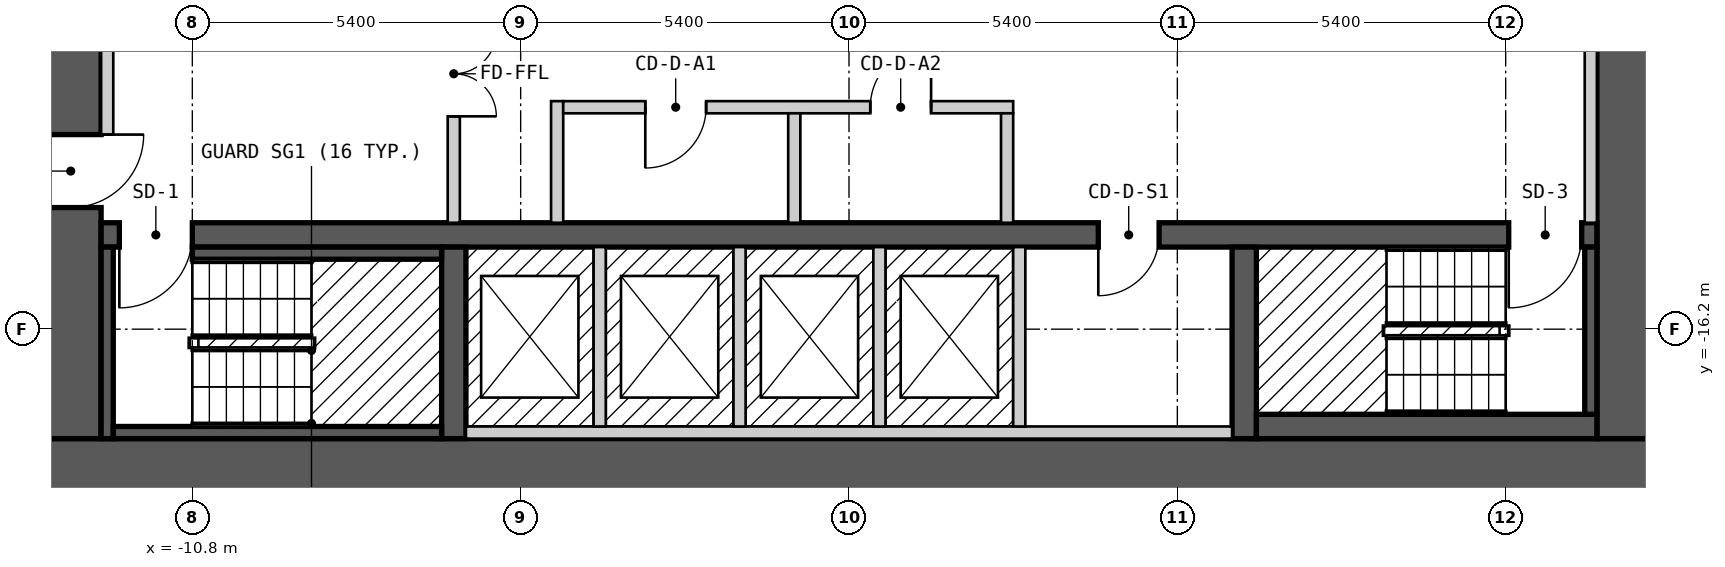
"""IFC4 building model, lengths in metres.
Left out: names, types, materials, properties, quantities, classifications, styles, units other than length and angle.
Written with IfcOpenShell. Run it as: python <this file> out.ifc"""

import sys

from ifc_helpers import new_model, si_unit, direction, frame, frame_2d, origin, place, context, subcontext, project, spatial, rectangle, extrude, element, fill, save


model = new_model("IFC4")
c1 = context("Model", 3, precision=1e-05, world=origin(), true_north=direction((0.0, 1.0)))
c2 = subcontext(c1, "Body", "Model", "MODEL_VIEW")
j1 = project(units=[si_unit("LENGTHUNIT", "METRE"), si_unit("PLANEANGLEUNIT", "RADIAN")], contexts=[c1])
p1 = place(None, origin())
s1 = spatial("IfcSite", under=j1, at=p1, CompositionType="ELEMENT")
p2 = place(p1, origin())
s2 = spatial("IfcBuilding", under=s1, at=p2, CompositionType="ELEMENT")
p3 = place(p2, frame((0.0, 0.0, 75.0)))
s3 = spatial("IfcBuildingStorey", under=s2, at=p3, CompositionType="ELEMENT", Elevation=75.0)
p4 = place(p3, frame((-13.3, -18.5, 0.0), z_axis=(0.0, 0.0, 1.0), x_axis=(1.0, 0.0, 0.0)))
e1 = element("IfcWall", 1, at=p4, inside=s3, PredefinedType="SHEAR", context=c2, shape_type="SweptSolid", body=[
    extrude(rectangle(XDim=26.6, YDim=1.0, at=frame_2d((13.3, 0.0))), origin(), (0.0, 0.0, 1.0), 2.7),
])
p5 = place(p3, frame((-12.8, -18.0, 0.0), z_axis=(0.0, 0.0, 1.0), x_axis=(0.0, 1.0, 0.0)))
e2 = element("IfcWall", 2, at=p5, inside=s3, PredefinedType="SHEAR", context=c2, shape_type="SweptSolid", body=[
    extrude(rectangle(XDim=12.0, YDim=1.0, at=frame_2d((6.0, 0.0))), origin(), (0.0, 0.0, 1.0), 2.7),
])
p6 = place(p5, frame((3.8, 0.0, 0.0)))
e3 = element("IfcOpeningElement", 3, at=p6, cuts=e2, PredefinedType="OPENING", context=c2, shape_type="SweptSolid", body=[
    extrude(rectangle(XDim=1.2, YDim=2.1, at=frame_2d((0.6, 1.05))), frame((0.0, 0.51, 0.0), z_axis=(0.0, -1.0, 0.0), x_axis=(1.0, 0.0, 0.0)), (0.0, 0.0, 1.0), 1.02),
])
p7 = place(p3, frame((12.8, -18.0, 0.0), z_axis=(0.0, 0.0, 1.0), x_axis=(0.0, 1.0, 0.0)))
e4 = element("IfcWall", 4, at=p7, inside=s3, PredefinedType="SHEAR", context=c2, shape_type="SweptSolid", body=[
    extrude(rectangle(XDim=12.0, YDim=1.0, at=frame_2d((6.0, 0.0))), origin(), (0.0, 0.0, 1.0), 2.7),
])
p8 = place(p3, frame((-12.3, -14.65, 0.0), z_axis=(0.0, 0.0, 1.0), x_axis=(1.0, 0.0, 0.0)))
e5 = element("IfcWall", 5, at=p8, inside=s3, PredefinedType="SHEAR", context=c2, shape_type="SweptSolid", body=[
    extrude(rectangle(XDim=24.6, YDim=0.4, at=frame_2d((12.3, 0.0))), origin(), (0.0, 0.0, 1.0), 2.7),
])
p9 = place(p8, frame((1.5, 0.0, 0.0), z_axis=(0.0, 0.0, 1.0), x_axis=(-1.0, 0.0, 0.0)))
e6 = element("IfcOpeningElement", 6, at=p9, cuts=e5, PredefinedType="OPENING", context=c2, shape_type="SweptSolid", body=[
    extrude(rectangle(XDim=1.2, YDim=2.1, at=frame_2d((0.6, 1.05))), frame((0.0, 0.21, 0.0), z_axis=(0.0, -1.0, 0.0), x_axis=(1.0, 0.0, 0.0)), (0.0, 0.0, 1.0), 0.42),
])
p10 = place(p8, frame((24.35, 0.0, 0.0), z_axis=(0.0, 0.0, 1.0), x_axis=(-1.0, 0.0, 0.0)))
e7 = element("IfcOpeningElement", 7, at=p10, cuts=e5, PredefinedType="OPENING", context=c2, shape_type="SweptSolid", body=[
    extrude(rectangle(XDim=1.2, YDim=2.1, at=frame_2d((0.6, 1.05))), frame((0.0, 0.21, 0.0), z_axis=(0.0, -1.0, 0.0), x_axis=(1.0, 0.0, 0.0)), (0.0, 0.0, 1.0), 0.42),
])
p11 = place(p8, frame((17.4, 0.0, 0.0), z_axis=(0.0, 0.0, 1.0), x_axis=(-1.0, 0.0, 0.0)))
e8 = element("IfcOpeningElement", 8, at=p11, cuts=e5, PredefinedType="OPENING", context=c2, shape_type="SweptSolid", body=[
    extrude(rectangle(XDim=1.0, YDim=2.1, at=frame_2d((0.5, 1.05))), frame((0.0, 0.21, 0.0), z_axis=(0.0, -1.0, 0.0), x_axis=(1.0, 0.0, 0.0)), (0.0, 0.0, 1.0), 0.42),
])
for number, where, z_axis, x_axis in (
    (9, (-6.5, -18.0, 0.0), (0.0, 0.0, 1.0), (0.0, 1.0, 0.0)),
    (10, (6.5, -18.0, 0.0), (0.0, 0.0, 1.0), (0.0, 1.0, 0.0)),
):
    element("IfcWall", number, at=place(p3, frame(where, z_axis=z_axis, x_axis=x_axis)), inside=s3, PredefinedType="SHEAR", context=c2, shape_type="SweptSolid", body=[
        extrude(rectangle(XDim=3.15, YDim=0.4, at=frame_2d((1.575, 0.0))), origin(), (0.0, 0.0, 1.0), 2.7),
    ])
p12 = place(p3, frame((-12.2, -18.0, 0.0), z_axis=(0.0, 0.0, 1.0), x_axis=(0.0, 1.0, 0.0)))
e11 = element("IfcWall", 11, at=p12, inside=s3, PredefinedType="SOLIDWALL", context=c2, shape_type="SweptSolid", body=[
    extrude(rectangle(XDim=3.15, YDim=0.2, at=frame_2d((1.575, 0.0))), origin(), (0.0, 0.0, 1.0), 2.7),
])
p13 = place(p3, frame((-12.2, -13.0, 0.0), z_axis=(0.0, 0.0, 1.0), x_axis=(0.0, 1.0, 0.0)))
e12 = element("IfcWall", 12, at=p13, inside=s3, PredefinedType="PARTITIONING", context=c2, shape_type="SweptSolid", body=[
    extrude(rectangle(XDim=3.45, YDim=0.2, at=frame_2d((1.725, 0.0))), origin(), (0.0, 0.0, 1.0), 2.7),
])
p14 = place(p3, frame((-12.1, -17.9, 0.0), z_axis=(0.0, 0.0, 1.0), x_axis=(1.0, 0.0, 0.0)))
e13 = element("IfcWall", 13, at=p14, inside=s3, PredefinedType="SOLIDWALL", context=c2, shape_type="SweptSolid", body=[
    extrude(rectangle(XDim=5.4, YDim=0.2, at=frame_2d((2.7, 0.0))), origin(), (0.0, 0.0, 1.0), 2.7),
])
p15 = place(p3, frame((-10.8, -14.95, 0.0), z_axis=(0.0, 0.0, 1.0), x_axis=(1.0, 0.0, 0.0)))
e14 = element("IfcWall", 14, at=p15, inside=s3, PredefinedType="SOLIDWALL", context=c2, shape_type="SweptSolid", body=[
    extrude(rectangle(XDim=4.1, YDim=0.2, at=frame_2d((2.05, 0.0))), origin(), (0.0, 0.0, 1.0), 2.7),
])
p16 = place(p3, frame((-6.5, -14.45, 0.0), z_axis=(0.0, 0.0, 1.0), x_axis=(0.0, 1.0, 0.0)))
e15 = element("IfcWall", 15, at=p16, inside=s3, PredefinedType="PARTITIONING", context=c2, shape_type="SweptSolid", body=[
    extrude(rectangle(XDim=4.9, YDim=0.2, at=frame_2d((2.45, 0.0))), origin(), (0.0, 0.0, 1.0), 2.7),
])
p17 = place(p16, frame((3.15, 0.0, 0.0), z_axis=(0.0, 0.0, 1.0), x_axis=(-1.0, 0.0, 0.0)))
e16 = element("IfcOpeningElement", 16, at=p17, cuts=e15, PredefinedType="OPENING", context=c2, shape_type="SweptSolid", body=[
    extrude(rectangle(XDim=1.4, YDim=2.1, at=frame_2d((0.7, 1.05))), frame((0.0, 0.11, 0.0), z_axis=(0.0, -1.0, 0.0), x_axis=(1.0, 0.0, 0.0)), (0.0, 0.0, 1.0), 0.22),
])
p18 = place(p3, frame((-6.3, -17.9, 0.0), z_axis=(0.0, 0.0, 1.0), x_axis=(1.0, 0.0, 0.0)))
e17 = element("IfcWall", 17, at=p18, inside=s3, PredefinedType="SOLIDWALL", context=c2, shape_type="SweptSolid", body=[
    extrude(rectangle(XDim=12.6, YDim=0.2, at=frame_2d((6.3, 0.0))), origin(), (0.0, 0.0, 1.0), 2.7),
])
p19 = place(p3, frame((-4.8, -14.45, 0.0), z_axis=(0.0, 0.0, 1.0), x_axis=(0.0, 1.0, 0.0)))
e18 = element("IfcWall", 18, at=p19, inside=s3, PredefinedType="PARTITIONING", context=c2, shape_type="SweptSolid", body=[
    extrude(rectangle(XDim=2.0, YDim=0.2, at=frame_2d((1.0, 0.0))), origin(), (0.0, 0.0, 1.0), 2.7),
])
p20 = place(p3, frame((-4.7, -12.55, 0.0), z_axis=(0.0, 0.0, 1.0), x_axis=(1.0, 0.0, 0.0)))
e19 = element("IfcWall", 19, at=p20, inside=s3, PredefinedType="PARTITIONING", context=c2, shape_type="SweptSolid", body=[
    extrude(rectangle(XDim=7.4, YDim=0.2, at=frame_2d((3.7, 0.0))), origin(), (0.0, 0.0, 1.0), 2.7),
])
p21 = place(p20, frame((2.35, 0.0, 0.0), z_axis=(0.0, 0.0, 1.0), x_axis=(-1.0, 0.0, 0.0)))
e20 = element("IfcOpeningElement", 20, at=p21, cuts=e19, PredefinedType="OPENING", context=c2, shape_type="SweptSolid", body=[
    extrude(rectangle(XDim=1.0, YDim=2.1, at=frame_2d((0.5, 1.05))), frame((0.0, 0.11, 0.0), z_axis=(0.0, -1.0, 0.0), x_axis=(1.0, 0.0, 0.0)), (0.0, 0.0, 1.0), 0.22),
])
p22 = place(p20, frame((6.05, 0.0, 0.0), z_axis=(0.0, 0.0, 1.0), x_axis=(-1.0, 0.0, 0.0)))
e21 = element("IfcOpeningElement", 21, at=p22, cuts=e19, PredefinedType="OPENING", context=c2, shape_type="SweptSolid", body=[
    extrude(rectangle(XDim=1.0, YDim=2.1, at=frame_2d((0.5, 1.05))), frame((0.0, 0.11, 0.0), z_axis=(0.0, -1.0, 0.0), x_axis=(1.0, 0.0, 0.0)), (0.0, 0.0, 1.0), 0.22),
])
for number, where, z_axis, x_axis in (
    (22, (-4.1, -17.8, 0.0), (0.0, 0.0, 1.0), (0.0, 1.0, 0.0)),
    (23, (-1.8, -17.8, 0.0), (0.0, 0.0, 1.0), (0.0, 1.0, 0.0)),
):
    element("IfcWall", number, at=place(p3, frame(where, z_axis=z_axis, x_axis=x_axis)), inside=s3, PredefinedType="SOLIDWALL", context=c2, shape_type="SweptSolid", body=[
        extrude(rectangle(XDim=2.95, YDim=0.2, at=frame_2d((1.475, 0.0))), origin(), (0.0, 0.0, 1.0), 2.7),
    ])
p23 = place(p3, frame((-0.9, -14.45, 0.0), z_axis=(0.0, 0.0, 1.0), x_axis=(0.0, 1.0, 0.0)))
e24 = element("IfcWall", 24, at=p23, inside=s3, PredefinedType="PARTITIONING", context=c2, shape_type="SweptSolid", body=[
    extrude(rectangle(XDim=1.8, YDim=0.2, at=frame_2d((0.9, 0.0))), origin(), (0.0, 0.0, 1.0), 2.7),
])
p24 = place(p3, frame((0.5, -17.8, 0.0), z_axis=(0.0, 0.0, 1.0), x_axis=(0.0, 1.0, 0.0)))
e25 = element("IfcWall", 25, at=p24, inside=s3, PredefinedType="SOLIDWALL", context=c2, shape_type="SweptSolid", body=[
    extrude(rectangle(XDim=2.95, YDim=0.2, at=frame_2d((1.475, 0.0))), origin(), (0.0, 0.0, 1.0), 2.7),
])
p25 = place(p3, frame((2.6, -14.45, 0.0), z_axis=(0.0, 0.0, 1.0), x_axis=(0.0, 1.0, 0.0)))
e26 = element("IfcWall", 26, at=p25, inside=s3, PredefinedType="PARTITIONING", context=c2, shape_type="SweptSolid", body=[
    extrude(rectangle(XDim=1.8, YDim=0.2, at=frame_2d((0.9, 0.0))), origin(), (0.0, 0.0, 1.0), 2.7),
])
p26 = place(p3, frame((2.8, -17.8, 0.0), z_axis=(0.0, 0.0, 1.0), x_axis=(0.0, 1.0, 0.0)))
e27 = element("IfcWall", 27, at=p26, inside=s3, PredefinedType="SOLIDWALL", context=c2, shape_type="SweptSolid", body=[
    extrude(rectangle(XDim=2.95, YDim=0.2, at=frame_2d((1.475, 0.0))), origin(), (0.0, 0.0, 1.0), 2.7),
])
p27 = place(p3, frame((6.7, -17.8, 0.0), z_axis=(0.0, 0.0, 1.0), x_axis=(1.0, 0.0, 0.0)))
e28 = element("IfcWall", 28, at=p27, inside=s3, PredefinedType="SOLIDWALL", context=c2, shape_type="SweptSolid", body=[
    extrude(rectangle(XDim=5.6, YDim=0.4, at=frame_2d((2.8, 0.0))), origin(), (0.0, 0.0, 1.0), 2.7),
])
p28 = place(p3, frame((12.2, -17.6, 0.0), z_axis=(0.0, 0.0, 1.0), x_axis=(0.0, 1.0, 0.0)))
e29 = element("IfcWall", 29, at=p28, inside=s3, PredefinedType="SOLIDWALL", context=c2, shape_type="SweptSolid", body=[
    extrude(rectangle(XDim=2.75, YDim=0.2, at=frame_2d((1.375, 0.0))), origin(), (0.0, 0.0, 1.0), 2.7),
])
p29 = place(p3, frame((12.2, -14.45, 0.0), z_axis=(0.0, 0.0, 1.0), x_axis=(0.0, 1.0, 0.0)))
e30 = element("IfcWall", 30, at=p29, inside=s3, PredefinedType="PARTITIONING", context=c2, shape_type="SweptSolid", body=[
    extrude(rectangle(XDim=8.25, YDim=0.2, at=frame_2d((4.125, 0.0))), origin(), (0.0, 0.0, 1.0), 2.7),
])
p30 = place(p9, origin())
e31 = element("IfcDoor", 31, at=p30, inside=s3, OperationType="SINGLE_SWING_RIGHT", PredefinedType="DOOR", context=c2, shape_type="SweptSolid", body=[
    extrude(rectangle(XDim=1.2, YDim=2.1, at=frame_2d((0.6, 1.05))), frame((0.0, 0.025, 0.0), z_axis=(0.0, -1.0, 0.0), x_axis=(1.0, 0.0, 0.0)), (0.0, 0.0, 1.0), 0.05),
])
fill(e6, e31)
p31 = place(p10, origin())
e32 = element("IfcDoor", 32, at=p31, inside=s3, OperationType="SINGLE_SWING_RIGHT", PredefinedType="DOOR", context=c2, shape_type="SweptSolid", body=[
    extrude(rectangle(XDim=1.2, YDim=2.1, at=frame_2d((0.6, 1.05))), frame((0.0, 0.025, 0.0), z_axis=(0.0, -1.0, 0.0), x_axis=(1.0, 0.0, 0.0)), (0.0, 0.0, 1.0), 0.05),
])
fill(e7, e32)
p32 = place(p6, origin())
e33 = element("IfcDoor", 33, at=p32, inside=s3, OperationType="SINGLE_SWING_RIGHT", PredefinedType="DOOR", context=c2, shape_type="SweptSolid", body=[
    extrude(rectangle(XDim=1.2, YDim=2.1, at=frame_2d((0.6, 1.05))), frame((0.0, 0.025, 0.0), z_axis=(0.0, -1.0, 0.0), x_axis=(1.0, 0.0, 0.0)), (0.0, 0.0, 1.0), 0.05),
])
fill(e3, e33)
p33 = place(p17, origin())
e34 = element("IfcDoor", 34, at=p33, inside=s3, OperationType="DOUBLE_DOOR_SINGLE_SWING", PredefinedType="DOOR", context=c2, shape_type="SweptSolid", body=[
    extrude(rectangle(XDim=1.4, YDim=2.1, at=frame_2d((0.7, 1.05))), frame((0.0, 0.025, 0.0), z_axis=(0.0, -1.0, 0.0), x_axis=(1.0, 0.0, 0.0)), (0.0, 0.0, 1.0), 0.05),
])
fill(e16, e34)
p34 = place(p21, origin())
e35 = element("IfcDoor", 35, at=p34, inside=s3, OperationType="SINGLE_SWING_RIGHT", PredefinedType="DOOR", context=c2, shape_type="SweptSolid", body=[
    extrude(rectangle(XDim=1.0, YDim=2.1, at=frame_2d((0.5, 1.05))), frame((0.0, 0.025, 0.0), z_axis=(0.0, -1.0, 0.0), x_axis=(1.0, 0.0, 0.0)), (0.0, 0.0, 1.0), 0.05),
])
fill(e20, e35)
p35 = place(p22, origin())
e36 = element("IfcDoor", 36, at=p35, inside=s3, OperationType="SINGLE_SWING_LEFT", PredefinedType="DOOR", context=c2, shape_type="SweptSolid", body=[
    extrude(rectangle(XDim=1.0, YDim=2.1, at=frame_2d((0.5, 1.05))), frame((0.0, 0.025, 0.0), z_axis=(0.0, -1.0, 0.0), x_axis=(1.0, 0.0, 0.0)), (0.0, 0.0, 1.0), 0.05),
])
fill(e21, e36)
p36 = place(p11, origin())
e37 = element("IfcDoor", 37, at=p36, inside=s3, OperationType="SINGLE_SWING_RIGHT", PredefinedType="DOOR", context=c2, shape_type="SweptSolid", body=[
    extrude(rectangle(XDim=1.0, YDim=2.1, at=frame_2d((0.5, 1.05))), frame((0.0, 0.025, 0.0), z_axis=(0.0, -1.0, 0.0), x_axis=(1.0, 0.0, 0.0)), (0.0, 0.0, 1.0), 0.05),
])
fill(e8, e37)
save(model, sys.argv[1])
